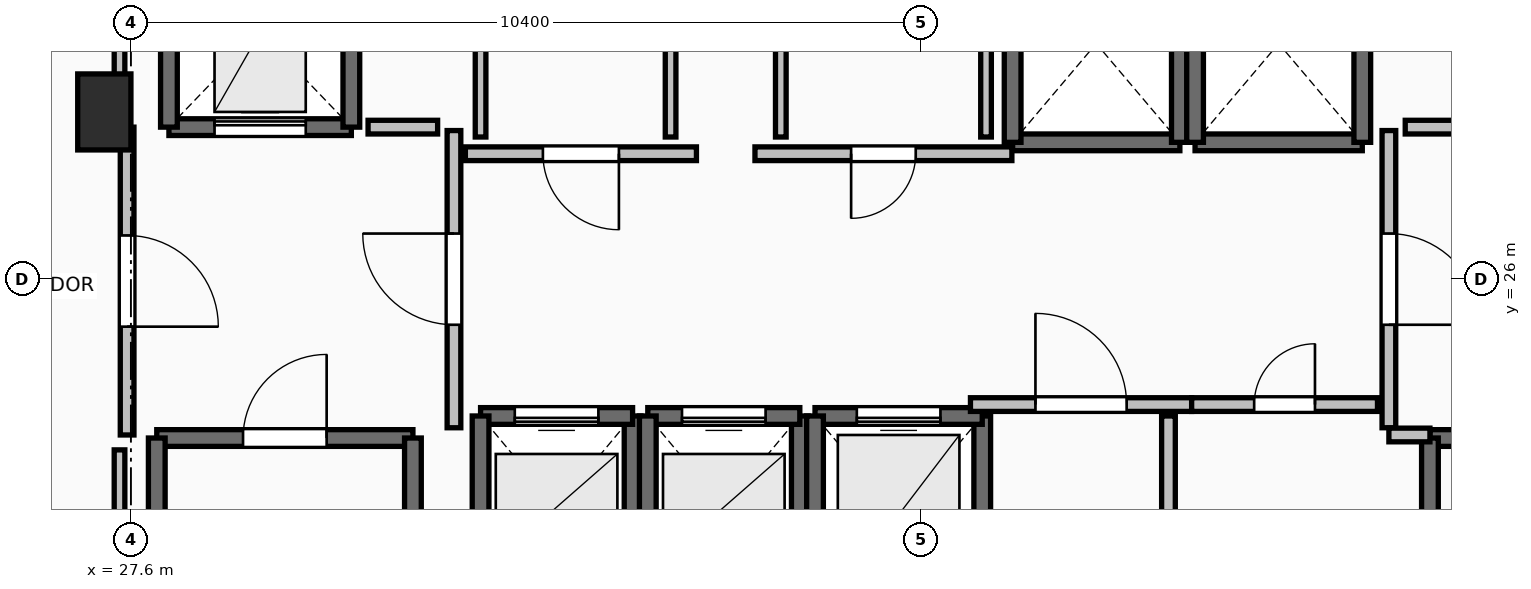
"""IFC4 building model, lengths in metres.
Left out: names, types, materials, properties, quantities, classifications, styles, units other than length and angle.
Written with IfcOpenShell. Run it as: python <this file> out.ifc"""

import sys

from ifc_helpers import new_model, si_unit, direction, frame, frame_2d, origin, origin_2d, place, context, subcontext, project, spatial, rectangle, extrude, element, fill, save


model = new_model("IFC4")
c1 = context("Model", 3, precision=1e-05, world=origin(), true_north=direction((0.0, 1.0)))
c2 = subcontext(c1, "Body", "Model", "MODEL_VIEW")
j1 = project(units=[si_unit("LENGTHUNIT", "METRE"), si_unit("PLANEANGLEUNIT", "RADIAN")], contexts=[c1])
p1 = place(None, origin())
s1 = spatial("IfcSite", under=j1, at=p1, CompositionType="ELEMENT")
p2 = place(p1, origin())
s2 = spatial("IfcBuilding", under=s1, at=p2, CompositionType="ELEMENT")
p3 = place(p2, frame((0.0, 0.0, 200.1)))
s3 = spatial("IfcBuildingStorey", under=s2, at=p3, CompositionType="ELEMENT", Elevation=200.1)
p4 = place(p3, frame((27.25, 28.2, 0.0), z_axis=(0.0, 0.0, 1.0), x_axis=(1.0, 0.0, 0.0)))
e1 = element("IfcColumn", 1, at=p4, inside=s3, PredefinedType="PILASTER", context=c2, shape_type="SweptSolid", body=[
    extrude(rectangle(XDim=0.7, YDim=1.0, at=origin_2d()), origin(), (0.0, 0.0, 1.0), 3.55),
])
p5 = place(p3, frame((27.94, 23.91, 0.0), z_axis=(0.0, 0.0, 1.0), x_axis=(1.0, 0.0, 0.0)))
e2 = element("IfcWall", 2, at=p5, inside=s3, PredefinedType="SOLIDWALL", context=c2, shape_type="SweptSolid", body=[
    extrude(rectangle(XDim=3.37, YDim=0.22, at=frame_2d((1.685, 0.0))), origin(), (0.0, 0.0, 1.0), 3.29),
])
p6 = place(p5, frame((1.135, 0.0, 0.0)))
e3 = element("IfcOpeningElement", 3, at=p6, cuts=e2, PredefinedType="OPENING", context=c2, shape_type="SweptSolid", body=[
    extrude(rectangle(XDim=1.1, YDim=2.15, at=frame_2d((0.55, 1.075))), frame((0.0, 0.125, 0.0), z_axis=(0.0, -1.0, 0.0), x_axis=(1.0, 0.0, 0.0)), (0.0, 0.0, 1.0), 0.25),
])
for number, where, z_axis, x_axis in (
    (4, (31.31, 23.91, 0.0), (0.0, 0.0, 1.0), (0.0, -1.0, 0.0)),
    (5, (27.94, 16.49, 0.0), (0.0, 0.0, 1.0), (0.0, 1.0, 0.0)),
):
    element("IfcWall", number, at=place(p3, frame(where, z_axis=z_axis, x_axis=x_axis)), inside=s3, PredefinedType="SOLIDWALL", context=c2, shape_type="SweptSolid", body=[
        extrude(rectangle(XDim=7.42, YDim=0.22, at=frame_2d((3.71, 0.0))), origin(), (0.0, 0.0, 1.0), 3.29),
    ])
p7 = place(p3, frame((44.69, 23.91, 0.0), z_axis=(0.0, 0.0, 1.0), x_axis=(1.0, 0.0, 0.0)))
e6 = element("IfcWall", 6, at=p7, inside=s3, PredefinedType="SOLIDWALL", context=c2, shape_type="SweptSolid", body=[
    extrude(rectangle(XDim=3.37, YDim=0.22, at=frame_2d((1.685, 0.0))), origin(), (0.0, 0.0, 1.0), 3.29),
])
p8 = place(p7, frame((1.135, 0.0, 0.0)))
e7 = element("IfcOpeningElement", 7, at=p8, cuts=e6, PredefinedType="OPENING", context=c2, shape_type="SweptSolid", body=[
    extrude(rectangle(XDim=1.1, YDim=2.15, at=frame_2d((0.55, 1.075))), frame((0.0, 0.125, 0.0), z_axis=(0.0, -1.0, 0.0), x_axis=(1.0, 0.0, 0.0)), (0.0, 0.0, 1.0), 0.25),
])
p9 = place(p3, frame((44.69, 16.49, 0.0), z_axis=(0.0, 0.0, 1.0), x_axis=(0.0, 1.0, 0.0)))
e8 = element("IfcWall", 8, at=p9, inside=s3, PredefinedType="SOLIDWALL", context=c2, shape_type="SweptSolid", body=[
    extrude(rectangle(XDim=7.42, YDim=0.22, at=frame_2d((3.71, 0.0))), origin(), (0.0, 0.0, 1.0), 3.29),
])
p10 = place(p3, frame((34.2, 21.8, 0.0), z_axis=(0.0, 0.0, 1.0), x_axis=(0.0, 1.0, 0.0)))
e9 = element("IfcWall", 9, at=p10, inside=s3, PredefinedType="SOLIDWALL", context=c2, shape_type="SweptSolid", body=[
    extrude(rectangle(XDim=2.4, YDim=0.22, at=frame_2d((1.2, 0.0))), origin(), (0.0, 0.0, 1.0), 3.29),
])
p11 = place(p3, frame((34.2, 24.2, 0.0), z_axis=(0.0, 0.0, 1.0), x_axis=(-1.0, 0.0, 0.0)))
e10 = element("IfcWall", 10, at=p11, inside=s3, PredefinedType="SOLIDWALL", context=c2, shape_type="SweptSolid", body=[
    extrude(rectangle(XDim=2.0, YDim=0.22, at=frame_2d((1.0, 0.0))), origin(), (0.0, 0.0, 1.0), 3.29),
])
p12 = place(p11, frame((0.45, 0.0, 0.0)))
e11 = element("IfcOpeningElement", 11, at=p12, cuts=e10, PredefinedType="OPENING", context=c2, shape_type="SweptSolid", body=[
    extrude(rectangle(XDim=1.1, YDim=2.2, at=frame_2d((0.55, 1.1))), frame((0.0, 0.125, 0.0), z_axis=(0.0, -1.0, 0.0), x_axis=(1.0, 0.0, 0.0)), (0.0, 0.0, 1.0), 0.25),
])
for number, where, z_axis, x_axis in (
    (12, (32.2, 24.2, 0.0), (0.0, 0.0, 1.0), (0.0, -1.0, 0.0)),
    (13, (36.4, 21.8, 0.0), (0.0, 0.0, 1.0), (0.0, 1.0, 0.0)),
):
    element("IfcWall", number, at=place(p3, frame(where, z_axis=z_axis, x_axis=x_axis)), inside=s3, PredefinedType="SOLIDWALL", context=c2, shape_type="SweptSolid", body=[
        extrude(rectangle(XDim=2.4, YDim=0.22, at=frame_2d((1.2, 0.0))), origin(), (0.0, 0.0, 1.0), 3.29),
    ])
p13 = place(p3, frame((36.4, 24.2, 0.0), z_axis=(0.0, 0.0, 1.0), x_axis=(-1.0, 0.0, 0.0)))
e14 = element("IfcWall", 14, at=p13, inside=s3, PredefinedType="SOLIDWALL", context=c2, shape_type="SweptSolid", body=[
    extrude(rectangle(XDim=2.0, YDim=0.22, at=frame_2d((1.0, 0.0))), origin(), (0.0, 0.0, 1.0), 3.29),
])
p14 = place(p13, frame((0.45, 0.0, 0.0)))
e15 = element("IfcOpeningElement", 15, at=p14, cuts=e14, PredefinedType="OPENING", context=c2, shape_type="SweptSolid", body=[
    extrude(rectangle(XDim=1.1, YDim=2.2, at=frame_2d((0.55, 1.1))), frame((0.0, 0.125, 0.0), z_axis=(0.0, -1.0, 0.0), x_axis=(1.0, 0.0, 0.0)), (0.0, 0.0, 1.0), 0.25),
])
p15 = place(p3, frame((34.4, 24.2, 0.0), z_axis=(0.0, 0.0, 1.0), x_axis=(0.0, -1.0, 0.0)))
e16 = element("IfcWall", 16, at=p15, inside=s3, PredefinedType="SOLIDWALL", context=c2, shape_type="SweptSolid", body=[
    extrude(rectangle(XDim=2.4, YDim=0.22, at=frame_2d((1.2, 0.0))), origin(), (0.0, 0.0, 1.0), 3.29),
])
p16 = place(p3, frame((38.8, 21.6, 0.0), z_axis=(0.0, 0.0, 1.0), x_axis=(0.0, 1.0, 0.0)))
e17 = element("IfcWall", 17, at=p16, inside=s3, PredefinedType="SOLIDWALL", context=c2, shape_type="SweptSolid", body=[
    extrude(rectangle(XDim=2.6, YDim=0.22, at=frame_2d((1.3, 0.0))), origin(), (0.0, 0.0, 1.0), 3.29),
])
p17 = place(p3, frame((38.8, 24.2, 0.0), z_axis=(0.0, 0.0, 1.0), x_axis=(-1.0, 0.0, 0.0)))
e18 = element("IfcWall", 18, at=p17, inside=s3, PredefinedType="SOLIDWALL", context=c2, shape_type="SweptSolid", body=[
    extrude(rectangle(XDim=2.2, YDim=0.22, at=frame_2d((1.1, 0.0))), origin(), (0.0, 0.0, 1.0), 3.29),
])
p18 = place(p17, frame((0.55, 0.0, 0.0)))
e19 = element("IfcOpeningElement", 19, at=p18, cuts=e18, PredefinedType="OPENING", context=c2, shape_type="SweptSolid", body=[
    extrude(rectangle(XDim=1.1, YDim=2.2, at=frame_2d((0.55, 1.1))), frame((0.0, 0.125, 0.0), z_axis=(0.0, -1.0, 0.0), x_axis=(1.0, 0.0, 0.0)), (0.0, 0.0, 1.0), 0.25),
])
p19 = place(p3, frame((36.6, 24.2, 0.0), z_axis=(0.0, 0.0, 1.0), x_axis=(0.0, -1.0, 0.0)))
e20 = element("IfcWall", 20, at=p19, inside=s3, PredefinedType="SOLIDWALL", context=c2, shape_type="SweptSolid", body=[
    extrude(rectangle(XDim=2.6, YDim=0.22, at=frame_2d((1.3, 0.0))), origin(), (0.0, 0.0, 1.0), 3.29),
])
p20 = place(p3, frame((39.2, 27.8, 0.0), z_axis=(0.0, 0.0, 1.0), x_axis=(1.0, 0.0, 0.0)))
e21 = element("IfcWall", 21, at=p20, inside=s3, PredefinedType="SOLIDWALL", context=c2, shape_type="SweptSolid", body=[
    extrude(rectangle(XDim=2.2, YDim=0.22, at=frame_2d((1.1, 0.0))), origin(), (0.0, 0.0, 1.0), 3.29),
])
for number, where, z_axis, x_axis in (
    (22, (41.4, 27.8, 0.0), (0.0, 0.0, 1.0), (0.0, 1.0, 0.0)),
    (23, (39.2, 30.4, 0.0), (0.0, 0.0, 1.0), (0.0, -1.0, 0.0)),
):
    element("IfcWall", number, at=place(p3, frame(where, z_axis=z_axis, x_axis=x_axis)), inside=s3, PredefinedType="SOLIDWALL", context=c2, shape_type="SweptSolid", body=[
        extrude(rectangle(XDim=2.6, YDim=0.22, at=frame_2d((1.3, 0.0))), origin(), (0.0, 0.0, 1.0), 3.29),
    ])
p21 = place(p3, frame((41.6, 27.8, 0.0), z_axis=(0.0, 0.0, 1.0), x_axis=(1.0, 0.0, 0.0)))
e24 = element("IfcWall", 24, at=p21, inside=s3, PredefinedType="SOLIDWALL", context=c2, shape_type="SweptSolid", body=[
    extrude(rectangle(XDim=2.2, YDim=0.22, at=frame_2d((1.1, 0.0))), origin(), (0.0, 0.0, 1.0), 3.29),
])
for number, where, z_axis, x_axis in (
    (25, (43.8, 27.8, 0.0), (0.0, 0.0, 1.0), (0.0, 1.0, 0.0)),
    (26, (41.6, 30.4, 0.0), (0.0, 0.0, 1.0), (0.0, -1.0, 0.0)),
):
    element("IfcWall", number, at=place(p3, frame(where, z_axis=z_axis, x_axis=x_axis)), inside=s3, PredefinedType="SOLIDWALL", context=c2, shape_type="SweptSolid", body=[
        extrude(rectangle(XDim=2.6, YDim=0.22, at=frame_2d((1.3, 0.0))), origin(), (0.0, 0.0, 1.0), 3.29),
    ])
p22 = place(p3, frame((28.1, 28.0, 0.0), z_axis=(0.0, 0.0, 1.0), x_axis=(1.0, 0.0, 0.0)))
e27 = element("IfcWall", 27, at=p22, inside=s3, PredefinedType="SHEAR", context=c2, shape_type="SweptSolid", body=[
    extrude(rectangle(XDim=2.4, YDim=0.22, at=frame_2d((1.2, 0.0))), origin(), (0.0, 0.0, 1.0), 3.29),
])
p23 = place(p22, frame((0.6, 0.0, 0.0)))
e28 = element("IfcOpeningElement", 28, at=p23, cuts=e27, PredefinedType="OPENING", context=c2, shape_type="SweptSolid", body=[
    extrude(rectangle(XDim=1.2, YDim=2.2, at=frame_2d((0.6, 1.1))), frame((0.0, 0.125, 0.0), z_axis=(0.0, -1.0, 0.0), x_axis=(1.0, 0.0, 0.0)), (0.0, 0.0, 1.0), 0.25),
])
for number, where, z_axis, x_axis in (
    (29, (30.5, 28.0, 0.0), (0.0, 0.0, 1.0), (0.0, 1.0, 0.0)),
    (30, (28.1, 30.5, 0.0), (0.0, 0.0, 1.0), (0.0, -1.0, 0.0)),
):
    element("IfcWall", number, at=place(p3, frame(where, z_axis=z_axis, x_axis=x_axis)), inside=s3, PredefinedType="SHEAR", context=c2, shape_type="SweptSolid", body=[
        extrude(rectangle(XDim=2.5, YDim=0.22, at=frame_2d((1.25, 0.0))), origin(), (0.0, 0.0, 1.0), 3.29),
    ])
p24 = place(p3, frame((31.85, 24.045, 0.0), z_axis=(0.0, 0.0, 1.0), x_axis=(0.0, 1.0, 0.0)))
e31 = element("IfcWall", 31, at=p24, inside=s3, PredefinedType="PARTITIONING", context=c2, shape_type="SweptSolid", body=[
    extrude(rectangle(XDim=3.91, YDim=0.18, at=frame_2d((1.955, 0.0))), origin(), (0.0, 0.0, 1.0), 3.29),
])
p25 = place(p24, frame((1.355, 0.0, 0.0)))
e32 = element("IfcOpeningElement", 32, at=p25, cuts=e31, PredefinedType="OPENING", context=c2, shape_type="SweptSolid", body=[
    extrude(rectangle(XDim=1.2, YDim=2.15, at=frame_2d((0.6, 1.075))), frame((0.0, 0.105, 0.0), z_axis=(0.0, -1.0, 0.0), x_axis=(1.0, 0.0, 0.0)), (0.0, 0.0, 1.0), 0.21),
])
p26 = place(p3, frame((27.55, 28.0, 0.0), z_axis=(0.0, 0.0, 1.0), x_axis=(0.0, -1.0, 0.0)))
e33 = element("IfcWall", 33, at=p26, inside=s3, PredefinedType="PARTITIONING", context=c2, shape_type="SweptSolid", body=[
    extrude(rectangle(XDim=4.05, YDim=0.18, at=frame_2d((2.025, 0.0))), origin(), (0.0, 0.0, 1.0), 3.29),
])
p27 = place(p26, frame((1.425, 0.0, 0.0)))
e34 = element("IfcOpeningElement", 34, at=p27, cuts=e33, PredefinedType="OPENING", context=c2, shape_type="SweptSolid", body=[
    extrude(rectangle(XDim=1.2, YDim=2.15, at=frame_2d((0.6, 1.075))), frame((0.0, 0.105, 0.0), z_axis=(0.0, -1.0, 0.0), x_axis=(1.0, 0.0, 0.0)), (0.0, 0.0, 1.0), 0.21),
])
p28 = place(p3, frame((44.15, 27.955, 0.0), z_axis=(0.0, 0.0, 1.0), x_axis=(0.0, -1.0, 0.0)))
e35 = element("IfcWall", 35, at=p28, inside=s3, PredefinedType="PARTITIONING", context=c2, shape_type="SweptSolid", body=[
    extrude(rectangle(XDim=3.91, YDim=0.18, at=frame_2d((1.955, 0.0))), origin(), (0.0, 0.0, 1.0), 3.29),
])
p29 = place(p28, frame((1.355, 0.0, 0.0)))
e36 = element("IfcOpeningElement", 36, at=p29, cuts=e35, PredefinedType="OPENING", context=c2, shape_type="SweptSolid", body=[
    extrude(rectangle(XDim=1.2, YDim=2.15, at=frame_2d((0.6, 1.075))), frame((0.0, 0.105, 0.0), z_axis=(0.0, -1.0, 0.0), x_axis=(1.0, 0.0, 0.0)), (0.0, 0.0, 1.0), 0.21),
])
p30 = place(p3, frame((44.15, 23.95, 0.0), z_axis=(0.0, 0.0, 1.0), x_axis=(1.0, 0.0, 0.0)))
e37 = element("IfcWall", 37, at=p30, inside=s3, PredefinedType="PARTITIONING", context=c2, shape_type="SweptSolid", body=[
    extrude(rectangle(XDim=0.54, YDim=0.18, at=frame_2d((0.27, 0.0))), origin(), (0.0, 0.0, 1.0), 3.29),
])
p31 = place(p3, frame((38.645, 24.35, 0.0), z_axis=(0.0, 0.0, 1.0), x_axis=(1.0, 0.0, 0.0)))
e38 = element("IfcWall", 38, at=p31, inside=s3, PredefinedType="PARTITIONING", context=c2, shape_type="SweptSolid", body=[
    extrude(rectangle(XDim=2.91, YDim=0.18, at=frame_2d((1.455, 0.0))), origin(), (0.0, 0.0, 1.0), 3.29),
])
p32 = place(p31, frame((0.855, 0.0, 0.0)))
e39 = element("IfcOpeningElement", 39, at=p32, cuts=e38, PredefinedType="OPENING", context=c2, shape_type="SweptSolid", body=[
    extrude(rectangle(XDim=1.2, YDim=2.15, at=frame_2d((0.6, 1.075))), frame((0.0, 0.105, 0.0), z_axis=(0.0, -1.0, 0.0), x_axis=(1.0, 0.0, 0.0)), (0.0, 0.0, 1.0), 0.21),
])
p33 = place(p3, frame((41.555, 24.35, 0.0), z_axis=(0.0, 0.0, 1.0), x_axis=(1.0, 0.0, 0.0)))
e40 = element("IfcWall", 40, at=p33, inside=s3, PredefinedType="PARTITIONING", context=c2, shape_type="SweptSolid", body=[
    extrude(rectangle(XDim=2.445, YDim=0.18, at=frame_2d((1.223, 0.0))), origin(), (0.0, 0.0, 1.0), 3.29),
])
p34 = place(p33, frame((0.823, 0.0, 0.0)))
e41 = element("IfcOpeningElement", 41, at=p34, cuts=e40, PredefinedType="OPENING", context=c2, shape_type="SweptSolid", body=[
    extrude(rectangle(XDim=0.8, YDim=2.05, at=frame_2d((0.4, 1.025))), frame((0.0, 0.105, 0.0), z_axis=(0.0, -1.0, 0.0), x_axis=(1.0, 0.0, 0.0)), (0.0, 0.0, 1.0), 0.21),
])
p35 = place(p3, frame((35.04, 27.65, 0.0), z_axis=(0.0, 0.0, 1.0), x_axis=(-1.0, 0.0, 0.0)))
e42 = element("IfcWall", 42, at=p35, inside=s3, PredefinedType="PARTITIONING", context=c2, shape_type="SweptSolid", body=[
    extrude(rectangle(XDim=3.04, YDim=0.18, at=frame_2d((1.52, 0.0))), origin(), (0.0, 0.0, 1.0), 3.29),
])
p36 = place(p35, frame((1.02, 0.0, 0.0)))
e43 = element("IfcOpeningElement", 43, at=p36, cuts=e42, PredefinedType="OPENING", context=c2, shape_type="SweptSolid", body=[
    extrude(rectangle(XDim=1.0, YDim=2.15, at=frame_2d((0.5, 1.075))), frame((0.0, 0.105, 0.0), z_axis=(0.0, -1.0, 0.0), x_axis=(1.0, 0.0, 0.0)), (0.0, 0.0, 1.0), 0.21),
])
p37 = place(p3, frame((39.19, 27.65, 0.0), z_axis=(0.0, 0.0, 1.0), x_axis=(-1.0, 0.0, 0.0)))
e44 = element("IfcWall", 44, at=p37, inside=s3, PredefinedType="PARTITIONING", context=c2, shape_type="SweptSolid", body=[
    extrude(rectangle(XDim=3.38, YDim=0.18, at=frame_2d((1.69, 0.0))), origin(), (0.0, 0.0, 1.0), 3.29),
])
p38 = place(p37, frame((1.265, 0.0, 0.0)))
e45 = element("IfcOpeningElement", 45, at=p38, cuts=e44, PredefinedType="OPENING", context=c2, shape_type="SweptSolid", body=[
    extrude(rectangle(XDim=0.85, YDim=2.1, at=frame_2d((0.425, 1.05))), frame((0.0, 0.105, 0.0), z_axis=(0.0, -1.0, 0.0), x_axis=(1.0, 0.0, 0.0)), (0.0, 0.0, 1.0), 0.21),
])
p39 = place(p3, frame((41.25, 16.32, 0.0), z_axis=(0.0, 0.0, 1.0), x_axis=(0.0, 1.0, 0.0)))
e46 = element("IfcWall", 46, at=p39, inside=s3, PredefinedType="PARTITIONING", context=c2, shape_type="SweptSolid", body=[
    extrude(rectangle(XDim=7.88, YDim=0.18, at=frame_2d((3.94, 0.0))), origin(), (0.0, 0.0, 1.0), 3.29),
])
p40 = place(p39, frame((3.54, 0.0, 0.0)))
e47 = element("IfcOpeningElement", 47, at=p40, cuts=e46, PredefinedType="OPENING", context=c2, shape_type="SweptSolid", body=[
    extrude(rectangle(XDim=0.8, YDim=2.05, at=frame_2d((0.4, 1.025))), frame((0.0, 0.105, 0.0), z_axis=(0.0, -1.0, 0.0), x_axis=(1.0, 0.0, 0.0)), (0.0, 0.0, 1.0), 0.21),
])
for number, where, z_axis, x_axis in (
    (48, (31.635, 28.0, 0.0), (0.0, 0.0, 1.0), (-1.0, 0.0, 0.0)),
    (49, (45.28, 28.0, 0.0), (0.0, 0.0, 1.0), (-1.0, 0.0, 0.0)),
):
    element("IfcWall", number, at=place(p3, frame(where, z_axis=z_axis, x_axis=x_axis)), inside=s3, PredefinedType="PARTITIONING", context=c2, shape_type="SweptSolid", body=[
        extrude(rectangle(XDim=0.915, YDim=0.18, at=frame_2d((0.458, 0.0))), origin(), (0.0, 0.0, 1.0), 3.29),
    ])
for number, where, z_axis, x_axis in (
    (50, (32.2, 30.26, 0.0), (0.0, 0.0, 1.0), (0.0, -1.0, 0.0)),
    (51, (34.7, 27.87, 0.0), (0.0, 0.0, 1.0), (0.0, 1.0, 0.0)),
):
    element("IfcWall", number, at=place(p3, frame(where, z_axis=z_axis, x_axis=x_axis)), inside=s3, PredefinedType="PARTITIONING", context=c2, shape_type="SweptSolid", body=[
        extrude(rectangle(XDim=2.39, YDim=0.14, at=frame_2d((1.195, 0.0))), origin(), (0.0, 0.0, 1.0), 3.29),
    ])
p41 = place(p3, frame((36.15, 30.03, 0.0), z_axis=(0.0, 0.0, 1.0), x_axis=(0.0, -1.0, 0.0)))
e52 = element("IfcWall", 52, at=p41, inside=s3, PredefinedType="PARTITIONING", context=c2, shape_type="SweptSolid", body=[
    extrude(rectangle(XDim=2.16, YDim=0.14, at=frame_2d((1.08, 0.0))), origin(), (0.0, 0.0, 1.0), 3.29),
])
p42 = place(p3, frame((38.85, 27.87, 0.0), z_axis=(0.0, 0.0, 1.0), x_axis=(0.0, 1.0, 0.0)))
e53 = element("IfcWall", 53, at=p42, inside=s3, PredefinedType="PARTITIONING", context=c2, shape_type="SweptSolid", body=[
    extrude(rectangle(XDim=2.39, YDim=0.14, at=frame_2d((1.195, 0.0))), origin(), (0.0, 0.0, 1.0), 3.29),
])
p43 = place(p3, frame((27.45, 33.45, 0.0), z_axis=(0.0, 0.0, 1.0), x_axis=(0.0, -1.0, 0.0)))
e54 = element("IfcWall", 54, at=p43, inside=s3, PredefinedType="PARTITIONING", context=c2, shape_type="SweptSolid", body=[
    extrude(rectangle(XDim=5.254, YDim=0.14, at=frame_2d((2.627, 0.0))), origin(), (0.0, 0.0, 1.0), 2.482),
])
p44 = place(p3, frame((27.45, 23.754, 0.0), z_axis=(0.0, 0.0, 1.0), x_axis=(0.0, -1.0, 0.0)))
e55 = element("IfcWall", 55, at=p44, inside=s3, PredefinedType="PARTITIONING", context=c2, shape_type="SweptSolid", body=[
    extrude(rectangle(XDim=7.514, YDim=0.14, at=frame_2d((3.757, 0.0))), origin(), (0.0, 0.0, 1.0), 2.482),
])
p45 = place(p6, origin())
e56 = element("IfcDoor", 56, at=p45, inside=s3, OperationType="SINGLE_SWING_RIGHT", PredefinedType="DOOR", context=c2, shape_type="SweptSolid", body=[
    extrude(rectangle(XDim=1.1, YDim=2.15, at=frame_2d((0.55, 1.075))), frame((0.0, 0.025, 0.0), z_axis=(0.0, -1.0, 0.0), x_axis=(1.0, 0.0, 0.0)), (0.0, 0.0, 1.0), 0.05),
])
fill(e3, e56)
p46 = place(p12, origin())
e57 = element("IfcDoor", 57, at=p46, inside=s3, OperationType="SLIDING_TO_LEFT", PredefinedType="DOOR", context=c2, shape_type="SweptSolid", body=[
    extrude(rectangle(XDim=1.1, YDim=2.2, at=frame_2d((0.55, 1.1))), frame((0.0, 0.025, 0.0), z_axis=(0.0, -1.0, 0.0), x_axis=(1.0, 0.0, 0.0)), (0.0, 0.0, 1.0), 0.05),
])
fill(e11, e57)
p47 = place(p14, origin())
e58 = element("IfcDoor", 58, at=p47, inside=s3, OperationType="SLIDING_TO_LEFT", PredefinedType="DOOR", context=c2, shape_type="SweptSolid", body=[
    extrude(rectangle(XDim=1.1, YDim=2.2, at=frame_2d((0.55, 1.1))), frame((0.0, 0.025, 0.0), z_axis=(0.0, -1.0, 0.0), x_axis=(1.0, 0.0, 0.0)), (0.0, 0.0, 1.0), 0.05),
])
fill(e15, e58)
p48 = place(p18, origin())
e59 = element("IfcDoor", 59, at=p48, inside=s3, OperationType="SLIDING_TO_LEFT", PredefinedType="DOOR", context=c2, shape_type="SweptSolid", body=[
    extrude(rectangle(XDim=1.1, YDim=2.2, at=frame_2d((0.55, 1.1))), frame((0.0, 0.025, 0.0), z_axis=(0.0, -1.0, 0.0), x_axis=(1.0, 0.0, 0.0)), (0.0, 0.0, 1.0), 0.05),
])
fill(e19, e59)
p49 = place(p23, origin())
e60 = element("IfcDoor", 60, at=p49, inside=s3, OperationType="SLIDING_TO_LEFT", PredefinedType="DOOR", context=c2, shape_type="SweptSolid", body=[
    extrude(rectangle(XDim=1.2, YDim=2.2, at=frame_2d((0.6, 1.1))), frame((0.0, 0.025, 0.0), z_axis=(0.0, -1.0, 0.0), x_axis=(1.0, 0.0, 0.0)), (0.0, 0.0, 1.0), 0.05),
])
fill(e28, e60)
p50 = place(p25, origin())
e61 = element("IfcDoor", 61, at=p50, inside=s3, OperationType="SINGLE_SWING_RIGHT", PredefinedType="DOOR", context=c2, shape_type="SweptSolid", body=[
    extrude(rectangle(XDim=1.2, YDim=2.15, at=frame_2d((0.6, 1.075))), frame((0.0, 0.025, 0.0), z_axis=(0.0, -1.0, 0.0), x_axis=(1.0, 0.0, 0.0)), (0.0, 0.0, 1.0), 0.05),
])
fill(e32, e61)
p51 = place(p27, origin())
e62 = element("IfcDoor", 62, at=p51, inside=s3, OperationType="SINGLE_SWING_RIGHT", PredefinedType="DOOR", context=c2, shape_type="SweptSolid", body=[
    extrude(rectangle(XDim=1.2, YDim=2.15, at=frame_2d((0.6, 1.075))), frame((0.0, 0.025, 0.0), z_axis=(0.0, -1.0, 0.0), x_axis=(1.0, 0.0, 0.0)), (0.0, 0.0, 1.0), 0.05),
])
fill(e34, e62)
p52 = place(p29, origin())
e63 = element("IfcDoor", 63, at=p52, inside=s3, OperationType="SINGLE_SWING_RIGHT", PredefinedType="DOOR", context=c2, shape_type="SweptSolid", body=[
    extrude(rectangle(XDim=1.2, YDim=2.15, at=frame_2d((0.6, 1.075))), frame((0.0, 0.025, 0.0), z_axis=(0.0, -1.0, 0.0), x_axis=(1.0, 0.0, 0.0)), (0.0, 0.0, 1.0), 0.05),
])
fill(e36, e63)
p53 = place(p32, origin())
e64 = element("IfcDoor", 64, at=p53, inside=s3, OperationType="SINGLE_SWING_LEFT", PredefinedType="DOOR", context=c2, shape_type="SweptSolid", body=[
    extrude(rectangle(XDim=1.2, YDim=2.15, at=frame_2d((0.6, 1.075))), frame((0.0, 0.025, 0.0), z_axis=(0.0, -1.0, 0.0), x_axis=(1.0, 0.0, 0.0)), (0.0, 0.0, 1.0), 0.05),
])
fill(e39, e64)
p54 = place(p34, origin())
e65 = element("IfcDoor", 65, at=p54, inside=s3, OperationType="SINGLE_SWING_RIGHT", PredefinedType="DOOR", context=c2, shape_type="SweptSolid", body=[
    extrude(rectangle(XDim=0.8, YDim=2.05, at=frame_2d((0.4, 1.025))), frame((0.0, 0.025, 0.0), z_axis=(0.0, -1.0, 0.0), x_axis=(1.0, 0.0, 0.0)), (0.0, 0.0, 1.0), 0.05),
])
fill(e41, e65)
p55 = place(p36, origin())
e66 = element("IfcDoor", 66, at=p55, inside=s3, OperationType="SINGLE_SWING_LEFT", PredefinedType="DOOR", context=c2, shape_type="SweptSolid", body=[
    extrude(rectangle(XDim=1.0, YDim=2.15, at=frame_2d((0.5, 1.075))), frame((0.0, 0.025, 0.0), z_axis=(0.0, -1.0, 0.0), x_axis=(1.0, 0.0, 0.0)), (0.0, 0.0, 1.0), 0.05),
])
fill(e43, e66)
p56 = place(p38, origin())
e67 = element("IfcDoor", 67, at=p56, inside=s3, OperationType="SINGLE_SWING_RIGHT", PredefinedType="DOOR", context=c2, shape_type="SweptSolid", body=[
    extrude(rectangle(XDim=0.85, YDim=2.1, at=frame_2d((0.425, 1.05))), frame((0.0, 0.025, 0.0), z_axis=(0.0, -1.0, 0.0), x_axis=(1.0, 0.0, 0.0)), (0.0, 0.0, 1.0), 0.05),
])
fill(e45, e67)
save(model, sys.argv[1])
